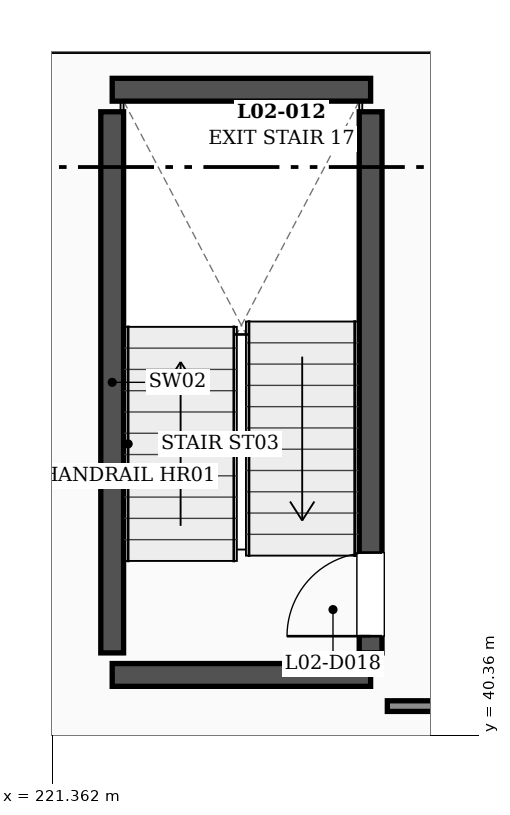
"""IFC4 building model, lengths in metres.
Left out: names, types, materials, properties, quantities, classifications, styles, units other than length and angle.
Written with IfcOpenShell. Run it as: python <this file> out.ifc"""

import sys

from ifc_helpers import new_model, si_unit, direction, frame, frame_2d, origin, place, context, subcontext, project, spatial, rectangle, extrude, element, fill, save


model = new_model("IFC4")
c1 = context("Model", 3, precision=1e-05, world=origin(), true_north=direction((0.0, 1.0)))
c2 = subcontext(c1, "Body", "Model", "MODEL_VIEW")
j1 = project(units=[si_unit("LENGTHUNIT", "METRE"), si_unit("PLANEANGLEUNIT", "RADIAN")], contexts=[c1])
p1 = place(None, origin())
s1 = spatial("IfcSite", under=j1, at=p1, CompositionType="ELEMENT")
p2 = place(p1, origin())
s2 = spatial("IfcBuilding", under=s1, at=p2, CompositionType="ELEMENT")
p3 = place(p2, frame((0.0, 0.0, 10.8)))
s3 = spatial("IfcBuildingStorey", under=s2, at=p3, CompositionType="ELEMENT", Elevation=10.8)
for number, where, z_axis, x_axis in (
    (1, (222.15, 41.15, 0.0), (0.0, 0.0, 1.0), (1.0, 0.0, 0.0)),
    (2, (222.15, 48.85, 0.0), (0.0, 0.0, 1.0), (1.0, 0.0, 0.0)),
):
    element("IfcWall", number, at=place(p3, frame(where, z_axis=z_axis, x_axis=x_axis)), inside=s3, PredefinedType="SHEAR", context=c2, shape_type="SweptSolid", body=[
        extrude(rectangle(XDim=3.4, YDim=0.3, at=frame_2d((1.7, 0.0))), origin(), (0.0, 0.0, 1.0), 4.2),
    ])
p4 = place(p3, frame((222.15, 41.44, 0.0), z_axis=(0.0, 0.0, 1.0), x_axis=(0.0, 1.0, 0.0)))
e3 = element("IfcWall", 3, at=p4, inside=s3, PredefinedType="SHEAR", context=c2, shape_type="SweptSolid", body=[
    extrude(rectangle(XDim=7.12, YDim=0.3, at=frame_2d((3.56, 0.0))), origin(), (0.0, 0.0, 1.0), 4.2),
])
p5 = place(p3, frame((225.55, 41.44, 0.0), z_axis=(0.0, 0.0, 1.0), x_axis=(0.0, 1.0, 0.0)))
e4 = element("IfcWall", 4, at=p5, inside=s3, PredefinedType="SHEAR", context=c2, shape_type="SweptSolid", body=[
    extrude(rectangle(XDim=7.12, YDim=0.3, at=frame_2d((3.56, 0.0))), origin(), (0.0, 0.0, 1.0), 4.2),
])
p6 = place(p5, frame((0.22, 0.0, 0.0)))
e5 = element("IfcOpeningElement", 5, at=p6, cuts=e4, PredefinedType="OPENING", context=c2, shape_type="SweptSolid", body=[
    extrude(rectangle(XDim=1.1, YDim=2.2, at=frame_2d((0.55, 1.1))), frame((0.0, 0.16, 0.0), z_axis=(0.0, -1.0, 0.0), x_axis=(1.0, 0.0, 0.0)), (0.0, 0.0, 1.0), 0.32),
])
p7 = place(p3, frame((225.77, 40.74, 0.0), z_axis=(0.0, 0.0, 1.0), x_axis=(1.0, 0.0, 0.0)))
e6 = element("IfcWall", 6, at=p7, inside=s3, PredefinedType="PARTITIONING", context=c2, shape_type="SweptSolid", body=[
    extrude(rectangle(XDim=4.55, YDim=0.14, at=frame_2d((2.275, 0.0))), origin(), (0.0, 0.0, 1.0), 3.86),
])
p8 = place(p6, origin())
e7 = element("IfcDoor", 7, at=p8, inside=s3, OperationType="SINGLE_SWING_LEFT", PredefinedType="DOOR", context=c2, shape_type="SweptSolid", body=[
    extrude(rectangle(XDim=1.1, YDim=2.2, at=frame_2d((0.55, 1.1))), frame((0.0, 0.025, 0.0), z_axis=(0.0, -1.0, 0.0), x_axis=(1.0, 0.0, 0.0)), (0.0, 0.0, 1.0), 0.05),
])
fill(e5, e7)
save(model, sys.argv[1])
